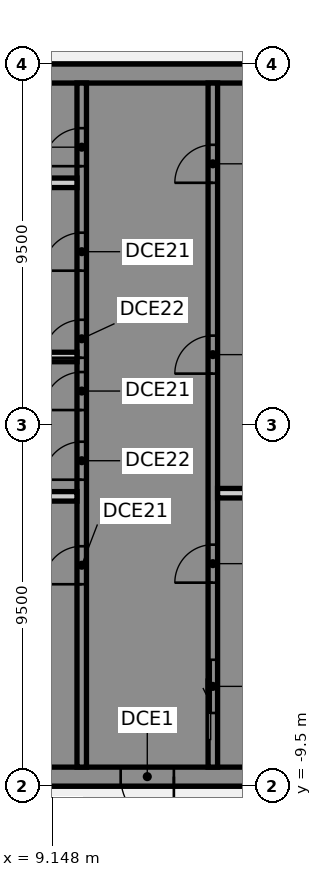
"""IFC4 building model, lengths in metres.
Left out: names, types, materials, properties, quantities, classifications, styles, units other than length and angle.
Written with IfcOpenShell. Run it as: python <this file> out.ifc"""

import sys

from ifc_helpers import new_model, si_unit, direction, frame, frame_2d, origin, place, context, subcontext, project, spatial, polyline, rectangle, outline, extrude, element, fill, save


model = new_model("IFC4")
c1 = context("Model", 3, precision=1e-05, world=origin(), true_north=direction((0.0, 1.0)))
c2 = subcontext(c1, "Body", "Model", "MODEL_VIEW")
j1 = project(units=[si_unit("LENGTHUNIT", "METRE"), si_unit("PLANEANGLEUNIT", "RADIAN")], contexts=[c1])
p1 = place(None, origin())
s1 = spatial("IfcSite", under=j1, at=p1, CompositionType="ELEMENT")
p2 = place(p1, origin())
s2 = spatial("IfcBuilding", under=s1, at=p2, CompositionType="ELEMENT")
p3 = place(p2, frame((0.0, 0.0, 313.4)))
s3 = spatial("IfcBuildingStorey", under=s2, at=p3, CompositionType="ELEMENT", Elevation=313.4)
p4 = place(p3, frame((16.5, -9.25, 0.0), z_axis=(0.0, 0.0, 1.0), x_axis=(-1.0, 0.0, 0.0)))
e1 = element("IfcWall", 1, at=p4, inside=s3, PredefinedType="SHEAR", context=c2, shape_type="SweptSolid", body=[
    extrude(rectangle(XDim=13.0, YDim=0.5, at=frame_2d((6.5, 0.0))), origin(), (0.0, 0.0, 1.0), 3.82),
])
p5 = place(p4, frame((4.15, 0.0, 0.0)))
e2 = element("IfcOpeningElement", 2, at=p5, cuts=e1, PredefinedType="OPENING", context=c2, shape_type="SweptSolid", body=[
    extrude(rectangle(XDim=1.4, YDim=2.1, at=frame_2d((0.7, 1.05))), frame((0.0, 0.26, 0.0), z_axis=(0.0, -1.0, 0.0), x_axis=(1.0, 0.0, 0.0)), (0.0, 0.0, 1.0), 0.52),
])
p6 = place(p4, frame((10.125, 0.0, 0.0)))
e3 = element("IfcOpeningElement", 3, at=p6, cuts=e1, PredefinedType="OPENING", context=c2, shape_type="SweptSolid", body=[
    extrude(rectangle(XDim=1.4, YDim=2.1, at=frame_2d((0.7, 1.05))), frame((0.0, 0.26, 0.0), z_axis=(0.0, -1.0, 0.0), x_axis=(1.0, 0.0, 0.0)), (0.0, 0.0, 1.0), 0.52),
])
p7 = place(p3, origin())
e4 = element("IfcWall", 4, at=p7, inside=s3, PredefinedType="SHEAR", context=c2, shape_type="SweptSolid", body=[
    extrude(outline(polyline([(13.5, -8.125), (13.5, -9.0), (16.0, -9.0), (16.5, -9.0), (16.5, 9.0), (16.0, 9.0), (13.5, 9.0), (13.5, 8.125), (16.0, 8.125), (16.0, -5.375), (13.5, -5.375), (13.5, -5.625), (16.0, -5.625), (16.0, -8.125), (13.5, -8.125)])), origin(), (0.0, 0.0, 1.0), 3.82),
])
p8 = place(p3, frame((16.5, 9.25, 0.0), z_axis=(0.0, 0.0, 1.0), x_axis=(-1.0, 0.0, 0.0)))
e5 = element("IfcWall", 5, at=p8, inside=s3, PredefinedType="SHEAR", context=c2, shape_type="SweptSolid", body=[
    extrude(rectangle(XDim=13.0, YDim=0.5, at=frame_2d((6.5, 0.0))), origin(), (0.0, 0.0, 1.0), 3.82),
])
p9 = place(p3, origin())
e6 = element("IfcWall", 6, at=p9, inside=s3, PredefinedType="SHEAR", context=c2, shape_type="SweptSolid", body=[
    extrude(outline(polyline([(9.8, -5.625), (9.8, -5.375), (7.5, -5.375), (7.5, 8.125), (9.8, 8.125), (9.8, 9.0), (7.5, 9.0), (7.25, 9.0), (7.25, -5.625), (7.5, -5.625), (9.8, -5.625)])), origin(), (0.0, 0.0, 1.0), 3.82),
])
p10 = place(p3, origin())
e7 = element("IfcWall", 7, at=p10, inside=s3, PredefinedType="SHEAR", context=c2, shape_type="SweptSolid", body=[
    extrude(outline(polyline([(7.5, -8.125), (7.5, -9.0), (9.8, -9.0), (9.8, -8.125), (9.8, -5.625), (9.55, -5.625), (9.55, -8.125), (7.5, -8.125)])), origin(), (0.0, 0.0, 1.0), 3.82),
])
p11 = place(p3, frame((13.375, -9.0, 0.0), z_axis=(0.0, 0.0, 1.0), x_axis=(0.0, 1.0, 0.0)))
e8 = element("IfcWall", 8, at=p11, inside=s3, PredefinedType="SHEAR", context=c2, shape_type="SweptSolid", body=[
    extrude(rectangle(XDim=18.0, YDim=0.25, at=frame_2d((9.0, 0.0))), origin(), (0.0, 0.0, 1.0), 3.82),
])
p12 = place(p11, frame((1.425, 0.0, 0.0)))
e9 = element("IfcOpeningElement", 9, at=p12, cuts=e8, PredefinedType="OPENING", context=c2, shape_type="SweptSolid", body=[
    extrude(rectangle(XDim=1.4, YDim=2.1, at=frame_2d((0.7, 1.05))), frame((0.0, 0.135, 0.0), z_axis=(0.0, -1.0, 0.0), x_axis=(1.0, 0.0, 0.0)), (0.0, 0.0, 1.0), 0.27),
])
p13 = place(p11, frame((4.854, 0.0, 0.0)))
e10 = element("IfcOpeningElement", 10, at=p13, cuts=e8, PredefinedType="OPENING", context=c2, shape_type="SweptSolid", body=[
    extrude(rectangle(XDim=1.0, YDim=2.1, at=frame_2d((0.5, 1.05))), frame((0.0, 0.135, 0.0), z_axis=(0.0, -1.0, 0.0), x_axis=(1.0, 0.0, 0.0)), (0.0, 0.0, 1.0), 0.27),
])
p14 = place(p11, frame((10.354, 0.0, 0.0)))
e11 = element("IfcOpeningElement", 11, at=p14, cuts=e8, PredefinedType="OPENING", context=c2, shape_type="SweptSolid", body=[
    extrude(rectangle(XDim=1.0, YDim=2.1, at=frame_2d((0.5, 1.05))), frame((0.0, 0.135, 0.0), z_axis=(0.0, -1.0, 0.0), x_axis=(1.0, 0.0, 0.0)), (0.0, 0.0, 1.0), 0.27),
])
p15 = place(p11, frame((15.375, 0.0, 0.0)))
e12 = element("IfcOpeningElement", 12, at=p15, cuts=e8, PredefinedType="OPENING", context=c2, shape_type="SweptSolid", body=[
    extrude(rectangle(XDim=1.0, YDim=2.1, at=frame_2d((0.5, 1.05))), frame((0.0, 0.135, 0.0), z_axis=(0.0, -1.0, 0.0), x_axis=(1.0, 0.0, 0.0)), (0.0, 0.0, 1.0), 0.27),
])
p16 = place(p3, frame((9.925, -9.0, 0.0), z_axis=(0.0, 0.0, 1.0), x_axis=(0.0, 1.0, 0.0)))
e13 = element("IfcWall", 13, at=p16, inside=s3, PredefinedType="SHEAR", context=c2, shape_type="SweptSolid", body=[
    extrude(rectangle(XDim=18.0, YDim=0.25, at=frame_2d((9.0, 0.0))), origin(), (0.0, 0.0, 1.0), 3.82),
])
p17 = place(p16, frame((4.812, 0.0, 0.0)))
e14 = element("IfcOpeningElement", 14, at=p17, cuts=e13, PredefinedType="OPENING", context=c2, shape_type="SweptSolid", body=[
    extrude(rectangle(XDim=1.0, YDim=2.1, at=frame_2d((0.5, 1.05))), frame((0.0, 0.135, 0.0), z_axis=(0.0, -1.0, 0.0), x_axis=(1.0, 0.0, 0.0)), (0.0, 0.0, 1.0), 0.27),
])
p18 = place(p16, frame((7.562, 0.0, 0.0)))
e15 = element("IfcOpeningElement", 15, at=p18, cuts=e13, PredefinedType="OPENING", context=c2, shape_type="SweptSolid", body=[
    extrude(rectangle(XDim=1.0, YDim=2.1, at=frame_2d((0.5, 1.05))), frame((0.0, 0.135, 0.0), z_axis=(0.0, -1.0, 0.0), x_axis=(1.0, 0.0, 0.0)), (0.0, 0.0, 1.0), 0.27),
])
p19 = place(p16, frame((9.396, 0.0, 0.0)))
e16 = element("IfcOpeningElement", 16, at=p19, cuts=e13, PredefinedType="OPENING", context=c2, shape_type="SweptSolid", body=[
    extrude(rectangle(XDim=1.0, YDim=2.1, at=frame_2d((0.5, 1.05))), frame((0.0, 0.135, 0.0), z_axis=(0.0, -1.0, 0.0), x_axis=(1.0, 0.0, 0.0)), (0.0, 0.0, 1.0), 0.27),
])
p20 = place(p16, frame((10.771, 0.0, 0.0)))
e17 = element("IfcOpeningElement", 17, at=p20, cuts=e13, PredefinedType="OPENING", context=c2, shape_type="SweptSolid", body=[
    extrude(rectangle(XDim=1.0, YDim=2.1, at=frame_2d((0.5, 1.05))), frame((0.0, 0.135, 0.0), z_axis=(0.0, -1.0, 0.0), x_axis=(1.0, 0.0, 0.0)), (0.0, 0.0, 1.0), 0.27),
])
p21 = place(p16, frame((13.062, 0.0, 0.0)))
e18 = element("IfcOpeningElement", 18, at=p21, cuts=e13, PredefinedType="OPENING", context=c2, shape_type="SweptSolid", body=[
    extrude(rectangle(XDim=1.0, YDim=2.1, at=frame_2d((0.5, 1.05))), frame((0.0, 0.135, 0.0), z_axis=(0.0, -1.0, 0.0), x_axis=(1.0, 0.0, 0.0)), (0.0, 0.0, 1.0), 0.27),
])
p22 = place(p16, frame((15.812, 0.0, 0.0)))
e19 = element("IfcOpeningElement", 19, at=p22, cuts=e13, PredefinedType="OPENING", context=c2, shape_type="SweptSolid", body=[
    extrude(rectangle(XDim=1.0, YDim=2.1, at=frame_2d((0.5, 1.05))), frame((0.0, 0.135, 0.0), z_axis=(0.0, -1.0, 0.0), x_axis=(1.0, 0.0, 0.0)), (0.0, 0.0, 1.0), 0.27),
])
for number, where, z_axis, x_axis in (
    (20, (15.8, -1.792, 0.0), (0.0, 0.0, 1.0), (-1.0, 0.0, 0.0)),
    (21, (9.8, -1.875, 0.0), (0.0, 0.0, 1.0), (-1.0, 0.0, 0.0)),
    (22, (9.8, 1.792, 0.0), (0.0, 0.0, 1.0), (-1.0, 0.0, 0.0)),
    (23, (9.8, 6.375, 0.0), (0.0, 0.0, 1.0), (-1.0, 0.0, 0.0)),
):
    element("IfcWall", number, at=place(p3, frame(where, z_axis=z_axis, x_axis=x_axis)), inside=s3, PredefinedType="PARTITIONING", context=c2, shape_type="SweptSolid", body=[
        extrude(rectangle(XDim=2.3, YDim=0.25, at=frame_2d((1.15, 0.0))), origin(), (0.0, 0.0, 1.0), 3.82),
    ])
p23 = place(p5, origin())
e24 = element("IfcDoor", 24, at=p23, inside=s3, OperationType="SINGLE_SWING_LEFT", PredefinedType="DOOR", context=c2, shape_type="SweptSolid", body=[
    extrude(rectangle(XDim=1.4, YDim=2.1, at=frame_2d((0.7, 1.05))), frame((0.0, 0.025, 0.0), z_axis=(0.0, -1.0, 0.0), x_axis=(1.0, 0.0, 0.0)), (0.0, 0.0, 1.0), 0.05),
])
fill(e2, e24)
p24 = place(p12, origin())
e25 = element("IfcDoor", 25, at=p24, inside=s3, OperationType="SLIDING_TO_LEFT", PredefinedType="DOOR", context=c2, shape_type="SweptSolid", body=[
    extrude(rectangle(XDim=1.4, YDim=2.1, at=frame_2d((0.7, 1.05))), frame((0.0, 0.025, 0.0), z_axis=(0.0, -1.0, 0.0), x_axis=(1.0, 0.0, 0.0)), (0.0, 0.0, 1.0), 0.05),
])
fill(e9, e25)
p25 = place(p13, origin())
e26 = element("IfcDoor", 26, at=p25, inside=s3, OperationType="SINGLE_SWING_LEFT", PredefinedType="DOOR", context=c2, shape_type="SweptSolid", body=[
    extrude(rectangle(XDim=1.0, YDim=2.1, at=frame_2d((0.5, 1.05))), frame((0.0, 0.025, 0.0), z_axis=(0.0, -1.0, 0.0), x_axis=(1.0, 0.0, 0.0)), (0.0, 0.0, 1.0), 0.05),
])
fill(e10, e26)
p26 = place(p14, origin())
e27 = element("IfcDoor", 27, at=p26, inside=s3, OperationType="SINGLE_SWING_LEFT", PredefinedType="DOOR", context=c2, shape_type="SweptSolid", body=[
    extrude(rectangle(XDim=1.0, YDim=2.1, at=frame_2d((0.5, 1.05))), frame((0.0, 0.025, 0.0), z_axis=(0.0, -1.0, 0.0), x_axis=(1.0, 0.0, 0.0)), (0.0, 0.0, 1.0), 0.05),
])
fill(e11, e27)
p27 = place(p15, origin())
e28 = element("IfcDoor", 28, at=p27, inside=s3, OperationType="SINGLE_SWING_LEFT", PredefinedType="DOOR", context=c2, shape_type="SweptSolid", body=[
    extrude(rectangle(XDim=1.0, YDim=2.1, at=frame_2d((0.5, 1.05))), frame((0.0, 0.025, 0.0), z_axis=(0.0, -1.0, 0.0), x_axis=(1.0, 0.0, 0.0)), (0.0, 0.0, 1.0), 0.05),
])
fill(e12, e28)
p28 = place(p17, origin())
e29 = element("IfcDoor", 29, at=p28, inside=s3, OperationType="SINGLE_SWING_LEFT", PredefinedType="DOOR", context=c2, shape_type="SweptSolid", body=[
    extrude(rectangle(XDim=1.0, YDim=2.1, at=frame_2d((0.5, 1.05))), frame((0.0, 0.025, 0.0), z_axis=(0.0, -1.0, 0.0), x_axis=(1.0, 0.0, 0.0)), (0.0, 0.0, 1.0), 0.05),
])
fill(e14, e29)
p29 = place(p18, origin())
e30 = element("IfcDoor", 30, at=p29, inside=s3, OperationType="SINGLE_SWING_LEFT", PredefinedType="DOOR", context=c2, shape_type="SweptSolid", body=[
    extrude(rectangle(XDim=1.0, YDim=2.1, at=frame_2d((0.5, 1.05))), frame((0.0, 0.025, 0.0), z_axis=(0.0, -1.0, 0.0), x_axis=(1.0, 0.0, 0.0)), (0.0, 0.0, 1.0), 0.05),
])
fill(e15, e30)
p30 = place(p19, origin())
e31 = element("IfcDoor", 31, at=p30, inside=s3, OperationType="SINGLE_SWING_LEFT", PredefinedType="DOOR", context=c2, shape_type="SweptSolid", body=[
    extrude(rectangle(XDim=1.0, YDim=2.1, at=frame_2d((0.5, 1.05))), frame((0.0, 0.025, 0.0), z_axis=(0.0, -1.0, 0.0), x_axis=(1.0, 0.0, 0.0)), (0.0, 0.0, 1.0), 0.05),
])
fill(e16, e31)
p31 = place(p20, origin())
e32 = element("IfcDoor", 32, at=p31, inside=s3, OperationType="SINGLE_SWING_LEFT", PredefinedType="DOOR", context=c2, shape_type="SweptSolid", body=[
    extrude(rectangle(XDim=1.0, YDim=2.1, at=frame_2d((0.5, 1.05))), frame((0.0, 0.025, 0.0), z_axis=(0.0, -1.0, 0.0), x_axis=(1.0, 0.0, 0.0)), (0.0, 0.0, 1.0), 0.05),
])
fill(e17, e32)
p32 = place(p21, origin())
e33 = element("IfcDoor", 33, at=p32, inside=s3, OperationType="SINGLE_SWING_LEFT", PredefinedType="DOOR", context=c2, shape_type="SweptSolid", body=[
    extrude(rectangle(XDim=1.0, YDim=2.1, at=frame_2d((0.5, 1.05))), frame((0.0, 0.025, 0.0), z_axis=(0.0, -1.0, 0.0), x_axis=(1.0, 0.0, 0.0)), (0.0, 0.0, 1.0), 0.05),
])
fill(e18, e33)
p33 = place(p22, origin())
e34 = element("IfcDoor", 34, at=p33, inside=s3, OperationType="SINGLE_SWING_LEFT", PredefinedType="DOOR", context=c2, shape_type="SweptSolid", body=[
    extrude(rectangle(XDim=1.0, YDim=2.1, at=frame_2d((0.5, 1.05))), frame((0.0, 0.025, 0.0), z_axis=(0.0, -1.0, 0.0), x_axis=(1.0, 0.0, 0.0)), (0.0, 0.0, 1.0), 0.05),
])
fill(e19, e34)
save(model, sys.argv[1])
